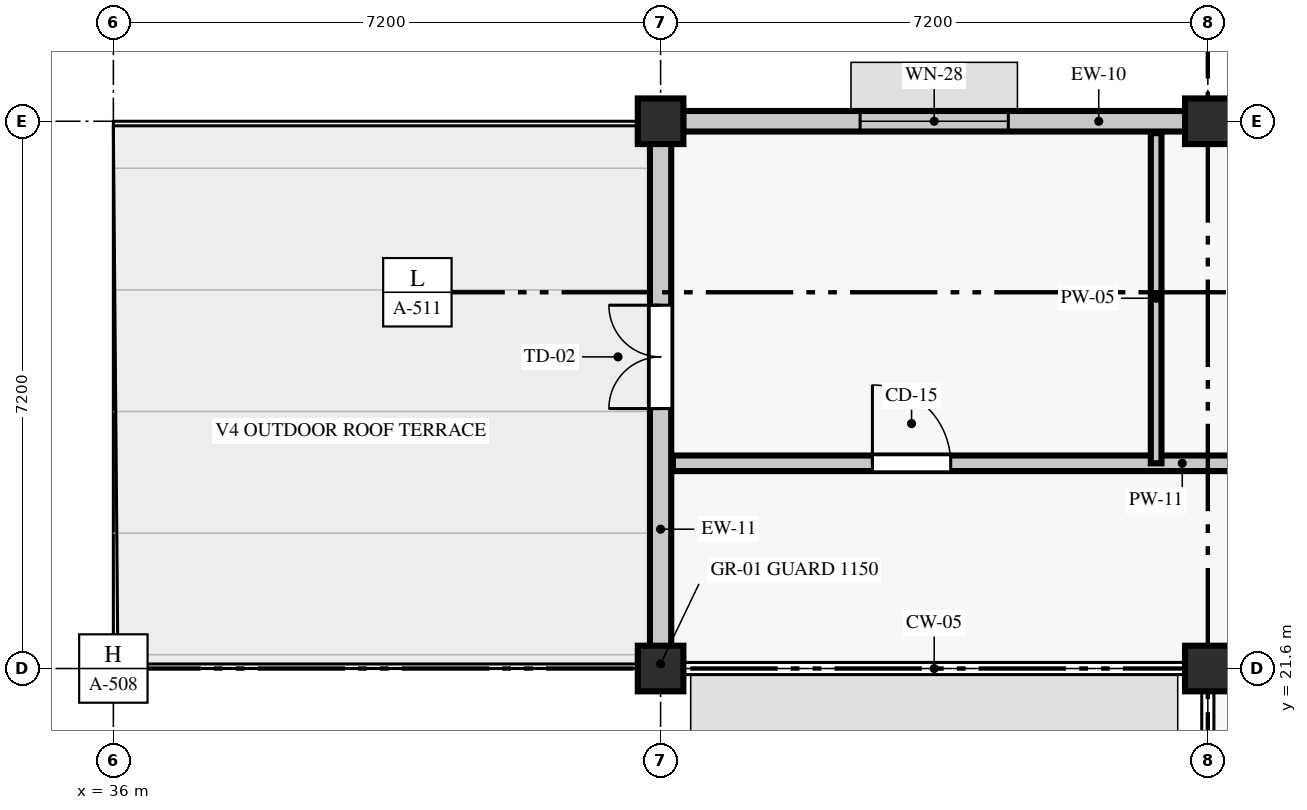
"""IFC4 building model, lengths in metres.
Left out: names, types, materials, properties, quantities, classifications, styles, units other than length and angle.
Written with IfcOpenShell. Run it as: python <this file> out.ifc"""

import sys

from ifc_helpers import new_model, si_unit, direction, frame, frame_2d, origin, origin_2d, place, context, subcontext, project, spatial, rectangle, extrude, element, fill, save


model = new_model("IFC4")
c1 = context("Model", 3, precision=1e-05, world=origin(), true_north=direction((0.0, 1.0)))
c2 = subcontext(c1, "Body", "Model", "MODEL_VIEW")
j1 = project(units=[si_unit("LENGTHUNIT", "METRE"), si_unit("PLANEANGLEUNIT", "RADIAN")], contexts=[c1])
p1 = place(None, origin())
s1 = spatial("IfcSite", under=j1, at=p1, CompositionType="ELEMENT")
p2 = place(p1, origin())
s2 = spatial("IfcBuilding", under=s1, at=p2, CompositionType="ELEMENT")
p3 = place(p2, frame((0.0, 0.0, 9.6)))
s3 = spatial("IfcBuildingStorey", under=s2, at=p3, CompositionType="ELEMENT", Elevation=9.6)
for number, where, z_axis, x_axis in (
    (1, (43.2, 21.6, 0.0), (0.0, 0.0, 1.0), (1.0, 0.0, 0.0)),
    (2, (43.2, 28.8, 0.0), (0.0, 0.0, 1.0), (1.0, 0.0, 0.0)),
    (3, (50.4, 21.6, 0.0), (0.0, 0.0, 1.0), (1.0, 0.0, 0.0)),
    (4, (50.4, 28.8, 0.0), (0.0, 0.0, 1.0), (1.0, 0.0, 0.0)),
):
    element("IfcColumn", number, at=place(p3, frame(where, z_axis=z_axis, x_axis=x_axis)), inside=s3, PredefinedType="COLUMN", context=c2, shape_type="SweptSolid", body=[
        extrude(rectangle(XDim=0.6, YDim=0.6, at=origin_2d()), origin(), (0.0, 0.0, 1.0), 3.942),
    ])
p4 = place(p3, frame((50.104, 28.8, 0.0), z_axis=(0.0, 0.0, 1.0), x_axis=(-1.0, 0.0, 0.0)))
e5 = element("IfcWall", 5, at=p4, inside=s3, PredefinedType="STANDARD", context=c2, shape_type="SweptSolid", body=[
    extrude(rectangle(XDim=6.608, YDim=0.27, at=frame_2d((3.304, 0.0))), origin(), (0.0, 0.0, 1.0), 3.292),
])
p5 = place(p4, frame((2.329, 0.0, 0.9)))
e6 = element("IfcOpeningElement", 6, at=p5, cuts=e5, PredefinedType="OPENING", context=c2, shape_type="SweptSolid", body=[
    extrude(rectangle(XDim=1.95, YDim=1.54, at=frame_2d((0.975, 0.77))), frame((0.0, 0.145, 0.0), z_axis=(0.0, -1.0, 0.0), x_axis=(1.0, 0.0, 0.0)), (0.0, 0.0, 1.0), 0.29),
])
p6 = place(p3, frame((43.2, 28.504, 0.0), z_axis=(0.0, 0.0, 1.0), x_axis=(0.0, -1.0, 0.0)))
e7 = element("IfcWall", 7, at=p6, inside=s3, PredefinedType="STANDARD", context=c2, shape_type="SweptSolid", body=[
    extrude(rectangle(XDim=6.608, YDim=0.28, at=frame_2d((3.304, 0.0))), origin(), (0.0, 0.0, 1.0), 3.292),
])
p7 = place(p6, frame((2.124, 0.0, 0.0)))
e8 = element("IfcOpeningElement", 8, at=p7, cuts=e7, PredefinedType="OPENING", context=c2, shape_type="SweptSolid", body=[
    extrude(rectangle(XDim=1.36, YDim=2.16, at=frame_2d((0.68, 1.08))), frame((0.0, 0.15, 0.0), z_axis=(0.0, -1.0, 0.0), x_axis=(1.0, 0.0, 0.0)), (0.0, 0.0, 1.0), 0.3),
])
p8 = place(p3, frame((43.362, 24.3, 0.0), z_axis=(0.0, 0.0, 1.0), x_axis=(1.0, 0.0, 0.0)))
e9 = element("IfcWall", 9, at=p8, inside=s3, PredefinedType="PARTITIONING", context=c2, shape_type="SweptSolid", body=[
    extrude(rectangle(XDim=14.218, YDim=0.205, at=frame_2d((7.109, 0.0))), origin(), (0.0, 0.0, 1.0), 3.292),
])
p9 = place(p8, frame((2.625, 0.0, 0.0)))
e10 = element("IfcOpeningElement", 10, at=p9, cuts=e9, PredefinedType="OPENING", context=c2, shape_type="SweptSolid", body=[
    extrude(rectangle(XDim=1.03, YDim=2.18, at=frame_2d((0.515, 1.09))), frame((0.0, 0.113, 0.0), z_axis=(0.0, -1.0, 0.0), x_axis=(1.0, 0.0, 0.0)), (0.0, 0.0, 1.0), 0.225),
])
p10 = place(p8, frame((9.748, 0.0, 0.0)))
e11 = element("IfcOpeningElement", 11, at=p10, cuts=e9, PredefinedType="OPENING", context=c2, shape_type="SweptSolid", body=[
    extrude(rectangle(XDim=1.08, YDim=2.18, at=frame_2d((0.54, 1.09))), frame((0.0, 0.113, 0.0), z_axis=(0.0, -1.0, 0.0), x_axis=(1.0, 0.0, 0.0)), (0.0, 0.0, 1.0), 0.225),
])
p11 = place(p3, frame((49.72, 24.3, 0.0), z_axis=(0.0, 0.0, 1.0), x_axis=(0.0, 1.0, 0.0)))
e12 = element("IfcWall", 12, at=p11, inside=s3, PredefinedType="PARTITIONING", context=c2, shape_type="SweptSolid", body=[
    extrude(rectangle(XDim=4.343, YDim=0.14, at=frame_2d((2.171, 0.0))), origin(), (0.0, 0.0, 1.0), 3.442),
])
p12 = place(p5, origin())
e13 = element("IfcWindow", 13, at=p12, inside=s3, PartitioningType="SINGLE_PANEL", PredefinedType="WINDOW", context=c2, shape_type="SweptSolid", body=[
    extrude(rectangle(XDim=1.95, YDim=1.54, at=frame_2d((0.975, 0.77))), frame((0.0, 0.03, 0.0), z_axis=(0.0, -1.0, 0.0), x_axis=(1.0, 0.0, 0.0)), (0.0, 0.0, 1.0), 0.06),
])
fill(e6, e13)
p13 = place(p7, frame((1.36, 0.0, 0.0), z_axis=(0.0, 0.0, 1.0), x_axis=(-1.0, 0.0, 0.0)))
e14 = element("IfcDoor", 14, at=p13, inside=s3, OperationType="DOUBLE_DOOR_SINGLE_SWING", PredefinedType="DOOR", context=c2, shape_type="SweptSolid", body=[
    extrude(rectangle(XDim=1.36, YDim=2.16, at=frame_2d((0.68, 1.08))), frame((0.0, 0.025, 0.0), z_axis=(0.0, -1.0, 0.0), x_axis=(1.0, 0.0, 0.0)), (0.0, 0.0, 1.0), 0.05),
])
fill(e8, e14)
p14 = place(p9, origin())
e15 = element("IfcDoor", 15, at=p14, inside=s3, OperationType="SINGLE_SWING_LEFT", PredefinedType="DOOR", context=c2, shape_type="SweptSolid", body=[
    extrude(rectangle(XDim=1.03, YDim=2.18, at=frame_2d((0.515, 1.09))), frame((0.0, 0.025, 0.0), z_axis=(0.0, -1.0, 0.0), x_axis=(1.0, 0.0, 0.0)), (0.0, 0.0, 1.0), 0.05),
])
fill(e10, e15)
save(model, sys.argv[1])
